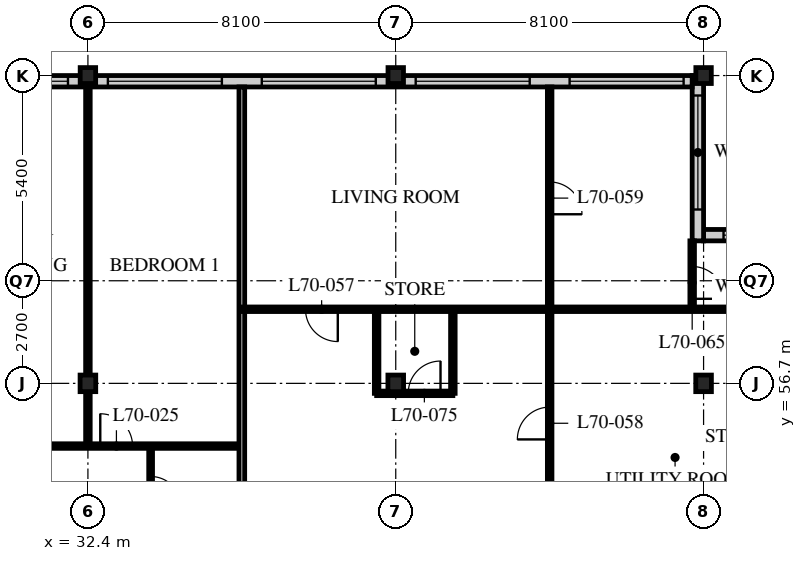
"""IFC4 building model, lengths in metres.
Left out: names, types, materials, properties, quantities, classifications, styles, units other than length and angle.
Written with IfcOpenShell. Run it as: python <this file> out.ifc"""

import sys

from ifc_helpers import new_model, si_unit, direction, frame, frame_2d, origin, origin_2d, place, context, subcontext, project, spatial, rectangle, i_section, extrude, element, fill, save


model = new_model("IFC4")
c1 = context("Model", 3, precision=1e-05, world=origin(), true_north=direction((0.0, 1.0)))
c2 = subcontext(c1, "Body", "Model", "MODEL_VIEW")
j1 = project(units=[si_unit("LENGTHUNIT", "METRE"), si_unit("PLANEANGLEUNIT", "RADIAN")], contexts=[c1])
p1 = place(None, origin())
s1 = spatial("IfcSite", under=j1, at=p1, CompositionType="ELEMENT")
p2 = place(p1, origin())
s2 = spatial("IfcBuilding", under=s1, at=p2, CompositionType="ELEMENT")
p3 = place(p2, frame((0.0, 0.0, 273.6)))
s3 = spatial("IfcBuildingStorey", under=s2, at=p3, CompositionType="ELEMENT", Elevation=273.6)
p4 = place(p3, frame((32.4, 56.7, 0.0), z_axis=(0.0, 0.0, 1.0), x_axis=(1.0, 0.0, 0.0)))
e1 = element("IfcColumn", 1, at=p4, inside=s3, PredefinedType="COLUMN", context=c2, shape_type="SweptSolid", body=[
    extrude(i_section(OverallWidth=0.412, OverallDepth=0.437, WebThickness=0.036, FlangeThickness=0.058, FilletRadius=0.015, at=origin_2d()), origin(), (0.0, 0.0, 1.0), 3.9),
])
p5 = place(p3, frame((32.4, 64.8, 0.0), z_axis=(0.0, 0.0, 1.0), x_axis=(1.0, 0.0, 0.0)))
e2 = element("IfcColumn", 2, at=p5, inside=s3, PredefinedType="COLUMN", context=c2, shape_type="SweptSolid", body=[
    extrude(i_section(OverallWidth=0.407, OverallDepth=0.419, WebThickness=0.031, FlangeThickness=0.049, FilletRadius=0.015, at=origin_2d()), origin(), (0.0, 0.0, 1.0), 3.9),
])
p6 = place(p3, frame((40.5, 56.7, 0.0), z_axis=(0.0, 0.0, 1.0), x_axis=(1.0, 0.0, 0.0)))
e3 = element("IfcColumn", 3, at=p6, inside=s3, PredefinedType="COLUMN", context=c2, shape_type="SweptSolid", body=[
    extrude(i_section(OverallWidth=0.412, OverallDepth=0.437, WebThickness=0.036, FlangeThickness=0.058, FilletRadius=0.015, at=origin_2d()), origin(), (0.0, 0.0, 1.0), 3.9),
])
p7 = place(p3, frame((40.5, 64.8, 0.0), z_axis=(0.0, 0.0, 1.0), x_axis=(1.0, 0.0, 0.0)))
e4 = element("IfcColumn", 4, at=p7, inside=s3, PredefinedType="COLUMN", context=c2, shape_type="SweptSolid", body=[
    extrude(i_section(OverallWidth=0.407, OverallDepth=0.419, WebThickness=0.031, FlangeThickness=0.049, FilletRadius=0.015, at=origin_2d()), origin(), (0.0, 0.0, 1.0), 3.9),
])
p8 = place(p3, frame((48.6, 56.7, 0.0), z_axis=(0.0, 0.0, 1.0), x_axis=(1.0, 0.0, 0.0)))
e5 = element("IfcColumn", 5, at=p8, inside=s3, PredefinedType="COLUMN", context=c2, shape_type="SweptSolid", body=[
    extrude(i_section(OverallWidth=0.412, OverallDepth=0.437, WebThickness=0.036, FlangeThickness=0.058, FilletRadius=0.015, at=origin_2d()), origin(), (0.0, 0.0, 1.0), 3.9),
])
p9 = place(p3, frame((48.6, 64.8, 0.0), z_axis=(0.0, 0.0, 1.0), x_axis=(1.0, 0.0, 0.0)))
e6 = element("IfcColumn", 6, at=p9, inside=s3, PredefinedType="COLUMN", context=c2, shape_type="SweptSolid", body=[
    extrude(i_section(OverallWidth=0.407, OverallDepth=0.419, WebThickness=0.031, FlangeThickness=0.049, FilletRadius=0.015, at=origin_2d()), origin(), (0.0, 0.0, 1.0), 3.9),
])
p10 = place(p3, frame((52.35, 60.6, 0.0), z_axis=(0.0, 0.0, 1.0), x_axis=(-1.0, 0.0, 0.0)))
e7 = element("IfcWall", 7, at=p10, inside=s3, PredefinedType="SOLIDWALL", context=c2, shape_type="SweptSolid", body=[
    extrude(rectangle(XDim=3.75, YDim=0.3, at=frame_2d((1.875, 0.0))), origin(), (0.0, 0.0, 1.0), 3.69),
])
p11 = place(p10, frame((0.225, 0.0, 0.6)))
e8 = element("IfcOpeningElement", 8, at=p11, cuts=e7, PredefinedType="OPENING", context=c2, shape_type="SweptSolid", body=[
    extrude(rectangle(XDim=3.0, YDim=2.3, at=frame_2d((1.5, 1.15))), frame((0.0, 0.16, 0.0), z_axis=(0.0, -1.0, 0.0), x_axis=(1.0, 0.0, 0.0)), (0.0, 0.0, 1.0), 0.32),
])
p12 = place(p3, frame((48.45, 60.45, 0.0), z_axis=(0.0, 0.0, 1.0), x_axis=(0.0, 1.0, 0.0)))
e9 = element("IfcWall", 9, at=p12, inside=s3, PredefinedType="SOLIDWALL", context=c2, shape_type="SweptSolid", body=[
    extrude(rectangle(XDim=4.35, YDim=0.3, at=frame_2d((2.175, 0.0))), origin(), (0.0, 0.0, 1.0), 3.69),
])
p13 = place(p12, frame((0.825, 0.0, 0.6)))
e10 = element("IfcOpeningElement", 10, at=p13, cuts=e9, PredefinedType="OPENING", context=c2, shape_type="SweptSolid", body=[
    extrude(rectangle(XDim=3.0, YDim=2.3, at=frame_2d((1.5, 1.15))), frame((0.0, 0.16, 0.0), z_axis=(0.0, -1.0, 0.0), x_axis=(1.0, 0.0, 0.0)), (0.0, 0.0, 1.0), 0.32),
])
p14 = place(p3, frame((48.3, 64.65, 0.0), z_axis=(0.0, 0.0, 1.0), x_axis=(-1.0, 0.0, 0.0)))
e11 = element("IfcWall", 11, at=p14, inside=s3, PredefinedType="SOLIDWALL", context=c2, shape_type="SweptSolid", body=[
    extrude(rectangle(XDim=40.2, YDim=0.3, at=frame_2d((20.1, 0.0))), origin(), (0.0, 0.0, 1.0), 3.69),
])
p15 = place(p14, frame((0.225, 0.0, 0.6)))
e12 = element("IfcOpeningElement", 12, at=p15, cuts=e11, PredefinedType="OPENING", context=c2, shape_type="SweptSolid", body=[
    extrude(rectangle(XDim=3.0, YDim=2.4, at=frame_2d((1.5, 1.2))), frame((0.0, 0.16, 0.0), z_axis=(0.0, -1.0, 0.0), x_axis=(1.0, 0.0, 0.0)), (0.0, 0.0, 1.0), 0.32),
])
p16 = place(p14, frame((4.275, 0.0, 0.6)))
e13 = element("IfcOpeningElement", 13, at=p16, cuts=e11, PredefinedType="OPENING", context=c2, shape_type="SweptSolid", body=[
    extrude(rectangle(XDim=3.0, YDim=2.4, at=frame_2d((1.5, 1.2))), frame((0.0, 0.16, 0.0), z_axis=(0.0, -1.0, 0.0), x_axis=(1.0, 0.0, 0.0)), (0.0, 0.0, 1.0), 0.32),
])
p17 = place(p14, frame((8.325, 0.0, 0.6)))
e14 = element("IfcOpeningElement", 14, at=p17, cuts=e11, PredefinedType="OPENING", context=c2, shape_type="SweptSolid", body=[
    extrude(rectangle(XDim=3.0, YDim=2.4, at=frame_2d((1.5, 1.2))), frame((0.0, 0.16, 0.0), z_axis=(0.0, -1.0, 0.0), x_axis=(1.0, 0.0, 0.0)), (0.0, 0.0, 1.0), 0.32),
])
p18 = place(p14, frame((12.375, 0.0, 0.6)))
e15 = element("IfcOpeningElement", 15, at=p18, cuts=e11, PredefinedType="OPENING", context=c2, shape_type="SweptSolid", body=[
    extrude(rectangle(XDim=3.0, YDim=2.4, at=frame_2d((1.5, 1.2))), frame((0.0, 0.16, 0.0), z_axis=(0.0, -1.0, 0.0), x_axis=(1.0, 0.0, 0.0)), (0.0, 0.0, 1.0), 0.32),
])
p19 = place(p14, frame((16.425, 0.0, 0.6)))
e16 = element("IfcOpeningElement", 16, at=p19, cuts=e11, PredefinedType="OPENING", context=c2, shape_type="SweptSolid", body=[
    extrude(rectangle(XDim=3.0, YDim=2.4, at=frame_2d((1.5, 1.2))), frame((0.0, 0.16, 0.0), z_axis=(0.0, -1.0, 0.0), x_axis=(1.0, 0.0, 0.0)), (0.0, 0.0, 1.0), 0.32),
])
p20 = place(p14, frame((20.475, 0.0, 0.6)))
e17 = element("IfcOpeningElement", 17, at=p20, cuts=e11, PredefinedType="OPENING", context=c2, shape_type="SweptSolid", body=[
    extrude(rectangle(XDim=3.0, YDim=2.4, at=frame_2d((1.5, 1.2))), frame((0.0, 0.16, 0.0), z_axis=(0.0, -1.0, 0.0), x_axis=(1.0, 0.0, 0.0)), (0.0, 0.0, 1.0), 0.32),
])
p21 = place(p14, frame((24.525, 0.0, 0.6)))
e18 = element("IfcOpeningElement", 18, at=p21, cuts=e11, PredefinedType="OPENING", context=c2, shape_type="SweptSolid", body=[
    extrude(rectangle(XDim=3.0, YDim=2.4, at=frame_2d((1.5, 1.2))), frame((0.0, 0.16, 0.0), z_axis=(0.0, -1.0, 0.0), x_axis=(1.0, 0.0, 0.0)), (0.0, 0.0, 1.0), 0.32),
])
p22 = place(p14, frame((28.575, 0.0, 0.6)))
e19 = element("IfcOpeningElement", 19, at=p22, cuts=e11, PredefinedType="OPENING", context=c2, shape_type="SweptSolid", body=[
    extrude(rectangle(XDim=3.0, YDim=2.4, at=frame_2d((1.5, 1.2))), frame((0.0, 0.16, 0.0), z_axis=(0.0, -1.0, 0.0), x_axis=(1.0, 0.0, 0.0)), (0.0, 0.0, 1.0), 0.32),
])
p23 = place(p14, frame((32.625, 0.0, 0.6)))
e20 = element("IfcOpeningElement", 20, at=p23, cuts=e11, PredefinedType="OPENING", context=c2, shape_type="SweptSolid", body=[
    extrude(rectangle(XDim=3.0, YDim=2.4, at=frame_2d((1.5, 1.2))), frame((0.0, 0.16, 0.0), z_axis=(0.0, -1.0, 0.0), x_axis=(1.0, 0.0, 0.0)), (0.0, 0.0, 1.0), 0.32),
])
p24 = place(p14, frame((36.675, 0.0, 0.6)))
e21 = element("IfcOpeningElement", 21, at=p24, cuts=e11, PredefinedType="OPENING", context=c2, shape_type="SweptSolid", body=[
    extrude(rectangle(XDim=3.0, YDim=2.4, at=frame_2d((1.5, 1.2))), frame((0.0, 0.16, 0.0), z_axis=(0.0, -1.0, 0.0), x_axis=(1.0, 0.0, 0.0)), (0.0, 0.0, 1.0), 0.32),
])
p25 = place(p3, frame((20.25, 55.05, 0.0), z_axis=(0.0, 0.0, 1.0), x_axis=(1.0, 0.0, 0.0)))
e22 = element("IfcWall", 22, at=p25, inside=s3, PredefinedType="PARTITIONING", context=c2, shape_type="SweptSolid", body=[
    extrude(rectangle(XDim=16.2, YDim=0.12, at=frame_2d((8.1, 0.0))), origin(), (0.0, 0.0, 1.0), 3.69),
])
p26 = place(p25, frame((0.975, 0.0, 0.0)))
e23 = element("IfcOpeningElement", 23, at=p26, cuts=e22, PredefinedType="OPENING", context=c2, shape_type="SweptSolid", body=[
    extrude(rectangle(XDim=0.85, YDim=2.1, at=frame_2d((0.425, 1.05))), frame((0.0, 0.07, 0.0), z_axis=(0.0, -1.0, 0.0), x_axis=(1.0, 0.0, 0.0)), (0.0, 0.0, 1.0), 0.14),
])
p27 = place(p25, frame((4.375, 0.0, 0.0)))
e24 = element("IfcOpeningElement", 24, at=p27, cuts=e22, PredefinedType="OPENING", context=c2, shape_type="SweptSolid", body=[
    extrude(rectangle(XDim=0.85, YDim=2.1, at=frame_2d((0.425, 1.05))), frame((0.0, 0.07, 0.0), z_axis=(0.0, -1.0, 0.0), x_axis=(1.0, 0.0, 0.0)), (0.0, 0.0, 1.0), 0.14),
])
p28 = place(p25, frame((9.075, 0.0, 0.0)))
e25 = element("IfcOpeningElement", 25, at=p28, cuts=e22, PredefinedType="OPENING", context=c2, shape_type="SweptSolid", body=[
    extrude(rectangle(XDim=0.85, YDim=2.1, at=frame_2d((0.425, 1.05))), frame((0.0, 0.07, 0.0), z_axis=(0.0, -1.0, 0.0), x_axis=(1.0, 0.0, 0.0)), (0.0, 0.0, 1.0), 0.14),
])
p29 = place(p25, frame((12.475, 0.0, 0.0)))
e26 = element("IfcOpeningElement", 26, at=p29, cuts=e22, PredefinedType="OPENING", context=c2, shape_type="SweptSolid", body=[
    extrude(rectangle(XDim=0.85, YDim=2.1, at=frame_2d((0.425, 1.05))), frame((0.0, 0.07, 0.0), z_axis=(0.0, -1.0, 0.0), x_axis=(1.0, 0.0, 0.0)), (0.0, 0.0, 1.0), 0.14),
])
p30 = place(p3, frame((34.05, 52.65, 0.0), z_axis=(0.0, 0.0, 1.0), x_axis=(0.0, 1.0, 0.0)))
e27 = element("IfcWall", 27, at=p30, inside=s3, PredefinedType="PARTITIONING", context=c2, shape_type="SweptSolid", body=[
    extrude(rectangle(XDim=2.4, YDim=0.1, at=frame_2d((1.2, 0.0))), origin(), (0.0, 0.0, 1.0), 3.69),
])
p31 = place(p30, frame((0.8, 0.0, 0.0)))
e28 = element("IfcOpeningElement", 28, at=p31, cuts=e27, PredefinedType="OPENING", context=c2, shape_type="SweptSolid", body=[
    extrude(rectangle(XDim=0.8, YDim=2.1, at=frame_2d((0.4, 1.05))), frame((0.0, 0.06, 0.0), z_axis=(0.0, -1.0, 0.0), x_axis=(1.0, 0.0, 0.0)), (0.0, 0.0, 1.0), 0.12),
])
p32 = place(p3, frame((32.4, 55.05, 0.0), z_axis=(0.0, 0.0, 1.0), x_axis=(0.0, 1.0, 0.0)))
e29 = element("IfcWall", 29, at=p32, inside=s3, PredefinedType="PARTITIONING", context=c2, shape_type="SweptSolid", body=[
    extrude(rectangle(XDim=9.45, YDim=0.12, at=frame_2d((4.725, 0.0))), origin(), (0.0, 0.0, 1.0), 3.078),
])
p33 = place(p3, frame((36.45, 64.5, 0.0), z_axis=(0.0, 0.0, 1.0), x_axis=(0.0, -1.0, 0.0)))
e30 = element("IfcWall", 30, at=p33, inside=s3, PredefinedType="PARTITIONING", context=c2, shape_type="SweptSolid", body=[
    extrude(rectangle(XDim=11.85, YDim=0.15, at=frame_2d((5.925, 0.0))), origin(), (0.0, 0.0, 1.0), 3.69),
])
p34 = place(p3, frame((36.45, 58.65, 0.0), z_axis=(0.0, 0.0, 1.0), x_axis=(1.0, 0.0, 0.0)))
e31 = element("IfcWall", 31, at=p34, inside=s3, PredefinedType="PARTITIONING", context=c2, shape_type="SweptSolid", body=[
    extrude(rectangle(XDim=15.9, YDim=0.12, at=frame_2d((7.95, 0.0))), origin(), (0.0, 0.0, 1.0), 3.69),
])
p35 = place(p34, frame((1.675, 0.0, 0.0)))
e32 = element("IfcOpeningElement", 32, at=p35, cuts=e31, PredefinedType="OPENING", context=c2, shape_type="SweptSolid", body=[
    extrude(rectangle(XDim=0.85, YDim=2.1, at=frame_2d((0.425, 1.05))), frame((0.0, 0.07, 0.0), z_axis=(0.0, -1.0, 0.0), x_axis=(1.0, 0.0, 0.0)), (0.0, 0.0, 1.0), 0.14),
])
p36 = place(p3, frame((44.55, 64.5, 0.0), z_axis=(0.0, 0.0, 1.0), x_axis=(0.0, -1.0, 0.0)))
e33 = element("IfcWall", 33, at=p36, inside=s3, PredefinedType="PARTITIONING", context=c2, shape_type="SweptSolid", body=[
    extrude(rectangle(XDim=13.65, YDim=0.12, at=frame_2d((6.825, 0.0))), origin(), (0.0, 0.0, 1.0), 3.69),
])
p37 = place(p36, frame((8.425, 0.0, 0.0)))
e34 = element("IfcOpeningElement", 34, at=p37, cuts=e33, PredefinedType="OPENING", context=c2, shape_type="SweptSolid", body=[
    extrude(rectangle(XDim=0.85, YDim=2.1, at=frame_2d((0.425, 1.05))), frame((0.0, 0.07, 0.0), z_axis=(0.0, -1.0, 0.0), x_axis=(1.0, 0.0, 0.0)), (0.0, 0.0, 1.0), 0.14),
])
p38 = place(p36, frame((2.5, 0.0, 0.0)))
e35 = element("IfcOpeningElement", 35, at=p38, cuts=e33, PredefinedType="OPENING", context=c2, shape_type="SweptSolid", body=[
    extrude(rectangle(XDim=0.85, YDim=2.1, at=frame_2d((0.425, 1.05))), frame((0.0, 0.07, 0.0), z_axis=(0.0, -1.0, 0.0), x_axis=(1.0, 0.0, 0.0)), (0.0, 0.0, 1.0), 0.14),
])
p39 = place(p3, frame((48.3, 58.65, 0.0), z_axis=(0.0, 0.0, 1.0), x_axis=(0.0, 1.0, 0.0)))
e36 = element("IfcWall", 36, at=p39, inside=s3, PredefinedType="PARTITIONING", context=c2, shape_type="SweptSolid", body=[
    extrude(rectangle(XDim=1.8, YDim=0.12, at=frame_2d((0.9, 0.0))), origin(), (0.0, 0.0, 1.0), 3.69),
])
p40 = place(p39, frame((0.275, 0.0, 0.0)))
e37 = element("IfcOpeningElement", 37, at=p40, cuts=e36, PredefinedType="OPENING", context=c2, shape_type="SweptSolid", body=[
    extrude(rectangle(XDim=0.85, YDim=2.1, at=frame_2d((0.425, 1.05))), frame((0.0, 0.07, 0.0), z_axis=(0.0, -1.0, 0.0), x_axis=(1.0, 0.0, 0.0)), (0.0, 0.0, 1.0), 0.14),
])
for number, where, z_axis, x_axis in (
    (38, (39.997, 58.65, 0.0), (0.0, 0.0, 1.0), (0.0, -1.0, 0.0)),
    (39, (42.003, 58.65, 0.0), (0.0, 0.0, 1.0), (0.0, -1.0, 0.0)),
):
    element("IfcWall", number, at=place(p3, frame(where, z_axis=z_axis, x_axis=x_axis)), inside=s3, PredefinedType="PARTITIONING", context=c2, shape_type="SweptSolid", body=[
        extrude(rectangle(XDim=2.213, YDim=0.12, at=frame_2d((1.106, 0.0))), origin(), (0.0, 0.0, 1.0), 3.69),
    ])
p41 = place(p3, frame((39.997, 56.437, 0.0), z_axis=(0.0, 0.0, 1.0), x_axis=(1.0, 0.0, 0.0)))
e40 = element("IfcWall", 40, at=p41, inside=s3, PredefinedType="PARTITIONING", context=c2, shape_type="SweptSolid", body=[
    extrude(rectangle(XDim=2.006, YDim=0.12, at=frame_2d((1.003, 0.0))), origin(), (0.0, 0.0, 1.0), 3.69),
])
p42 = place(p41, frame((0.831, 0.0, 0.0)))
e41 = element("IfcOpeningElement", 41, at=p42, cuts=e40, PredefinedType="OPENING", context=c2, shape_type="SweptSolid", body=[
    extrude(rectangle(XDim=0.85, YDim=2.1, at=frame_2d((0.425, 1.05))), frame((0.0, 0.07, 0.0), z_axis=(0.0, -1.0, 0.0), x_axis=(1.0, 0.0, 0.0)), (0.0, 0.0, 1.0), 0.14),
])
p43 = place(p11, origin())
e42 = element("IfcWindow", 42, at=p43, inside=s3, PartitioningType="SINGLE_PANEL", PredefinedType="WINDOW", context=c2, shape_type="SweptSolid", body=[
    extrude(rectangle(XDim=3.0, YDim=2.3, at=frame_2d((1.5, 1.15))), frame((0.0, 0.03, 0.0), z_axis=(0.0, -1.0, 0.0), x_axis=(1.0, 0.0, 0.0)), (0.0, 0.0, 1.0), 0.06),
])
fill(e8, e42)
p44 = place(p13, origin())
e43 = element("IfcWindow", 43, at=p44, inside=s3, PartitioningType="SINGLE_PANEL", PredefinedType="WINDOW", context=c2, shape_type="SweptSolid", body=[
    extrude(rectangle(XDim=3.0, YDim=2.3, at=frame_2d((1.5, 1.15))), frame((0.0, 0.03, 0.0), z_axis=(0.0, -1.0, 0.0), x_axis=(1.0, 0.0, 0.0)), (0.0, 0.0, 1.0), 0.06),
])
fill(e10, e43)
p45 = place(p15, origin())
e44 = element("IfcWindow", 44, at=p45, inside=s3, PartitioningType="SINGLE_PANEL", PredefinedType="WINDOW", context=c2, shape_type="SweptSolid", body=[
    extrude(rectangle(XDim=3.0, YDim=2.4, at=frame_2d((1.5, 1.2))), frame((0.0, 0.03, 0.0), z_axis=(0.0, -1.0, 0.0), x_axis=(1.0, 0.0, 0.0)), (0.0, 0.0, 1.0), 0.06),
])
fill(e12, e44)
p46 = place(p16, origin())
e45 = element("IfcWindow", 45, at=p46, inside=s3, PartitioningType="SINGLE_PANEL", PredefinedType="WINDOW", context=c2, shape_type="SweptSolid", body=[
    extrude(rectangle(XDim=3.0, YDim=2.4, at=frame_2d((1.5, 1.2))), frame((0.0, 0.03, 0.0), z_axis=(0.0, -1.0, 0.0), x_axis=(1.0, 0.0, 0.0)), (0.0, 0.0, 1.0), 0.06),
])
fill(e13, e45)
p47 = place(p17, origin())
e46 = element("IfcWindow", 46, at=p47, inside=s3, PartitioningType="SINGLE_PANEL", PredefinedType="WINDOW", context=c2, shape_type="SweptSolid", body=[
    extrude(rectangle(XDim=3.0, YDim=2.4, at=frame_2d((1.5, 1.2))), frame((0.0, 0.03, 0.0), z_axis=(0.0, -1.0, 0.0), x_axis=(1.0, 0.0, 0.0)), (0.0, 0.0, 1.0), 0.06),
])
fill(e14, e46)
p48 = place(p18, origin())
e47 = element("IfcWindow", 47, at=p48, inside=s3, PartitioningType="SINGLE_PANEL", PredefinedType="WINDOW", context=c2, shape_type="SweptSolid", body=[
    extrude(rectangle(XDim=3.0, YDim=2.4, at=frame_2d((1.5, 1.2))), frame((0.0, 0.03, 0.0), z_axis=(0.0, -1.0, 0.0), x_axis=(1.0, 0.0, 0.0)), (0.0, 0.0, 1.0), 0.06),
])
fill(e15, e47)
p49 = place(p19, origin())
e48 = element("IfcWindow", 48, at=p49, inside=s3, PartitioningType="SINGLE_PANEL", PredefinedType="WINDOW", context=c2, shape_type="SweptSolid", body=[
    extrude(rectangle(XDim=3.0, YDim=2.4, at=frame_2d((1.5, 1.2))), frame((0.0, 0.03, 0.0), z_axis=(0.0, -1.0, 0.0), x_axis=(1.0, 0.0, 0.0)), (0.0, 0.0, 1.0), 0.06),
])
fill(e16, e48)
p50 = place(p31, origin())
e49 = element("IfcDoor", 49, at=p50, inside=s3, OperationType="SINGLE_SWING_RIGHT", PredefinedType="DOOR", context=c2, shape_type="SweptSolid", body=[
    extrude(rectangle(XDim=0.8, YDim=2.1, at=frame_2d((0.4, 1.05))), frame((0.0, 0.025, 0.0), z_axis=(0.0, -1.0, 0.0), x_axis=(1.0, 0.0, 0.0)), (0.0, 0.0, 1.0), 0.05),
])
fill(e28, e49)
p51 = place(p29, origin())
e50 = element("IfcDoor", 50, at=p51, inside=s3, OperationType="SINGLE_SWING_LEFT", PredefinedType="DOOR", context=c2, shape_type="SweptSolid", body=[
    extrude(rectangle(XDim=0.85, YDim=2.1, at=frame_2d((0.425, 1.05))), frame((0.0, 0.025, 0.0), z_axis=(0.0, -1.0, 0.0), x_axis=(1.0, 0.0, 0.0)), (0.0, 0.0, 1.0), 0.05),
])
fill(e26, e50)
p52 = place(p35, origin())
e51 = element("IfcDoor", 51, at=p52, inside=s3, OperationType="SINGLE_SWING_LEFT", PredefinedType="DOOR", context=c2, shape_type="SweptSolid", body=[
    extrude(rectangle(XDim=0.85, YDim=2.1, at=frame_2d((0.425, 1.05))), frame((0.0, 0.025, 0.0), z_axis=(0.0, -1.0, 0.0), x_axis=(1.0, 0.0, 0.0)), (0.0, 0.0, 1.0), 0.05),
])
fill(e32, e51)
p53 = place(p37, origin())
e52 = element("IfcDoor", 52, at=p53, inside=s3, OperationType="SINGLE_SWING_LEFT", PredefinedType="DOOR", context=c2, shape_type="SweptSolid", body=[
    extrude(rectangle(XDim=0.85, YDim=2.1, at=frame_2d((0.425, 1.05))), frame((0.0, 0.025, 0.0), z_axis=(0.0, -1.0, 0.0), x_axis=(1.0, 0.0, 0.0)), (0.0, 0.0, 1.0), 0.05),
])
fill(e34, e52)
p54 = place(p38, origin())
e53 = element("IfcDoor", 53, at=p54, inside=s3, OperationType="SINGLE_SWING_RIGHT", PredefinedType="DOOR", context=c2, shape_type="SweptSolid", body=[
    extrude(rectangle(XDim=0.85, YDim=2.1, at=frame_2d((0.425, 1.05))), frame((0.0, 0.025, 0.0), z_axis=(0.0, -1.0, 0.0), x_axis=(1.0, 0.0, 0.0)), (0.0, 0.0, 1.0), 0.05),
])
fill(e35, e53)
p55 = place(p40, origin())
e54 = element("IfcDoor", 54, at=p55, inside=s3, OperationType="SINGLE_SWING_RIGHT", PredefinedType="DOOR", context=c2, shape_type="SweptSolid", body=[
    extrude(rectangle(XDim=0.85, YDim=2.1, at=frame_2d((0.425, 1.05))), frame((0.0, 0.025, 0.0), z_axis=(0.0, -1.0, 0.0), x_axis=(1.0, 0.0, 0.0)), (0.0, 0.0, 1.0), 0.05),
])
fill(e37, e54)
p56 = place(p42, origin())
e55 = element("IfcDoor", 55, at=p56, inside=s3, OperationType="SINGLE_SWING_RIGHT", PredefinedType="DOOR", context=c2, shape_type="SweptSolid", body=[
    extrude(rectangle(XDim=0.85, YDim=2.1, at=frame_2d((0.425, 1.05))), frame((0.0, 0.025, 0.0), z_axis=(0.0, -1.0, 0.0), x_axis=(1.0, 0.0, 0.0)), (0.0, 0.0, 1.0), 0.05),
])
fill(e41, e55)
save(model, sys.argv[1])
